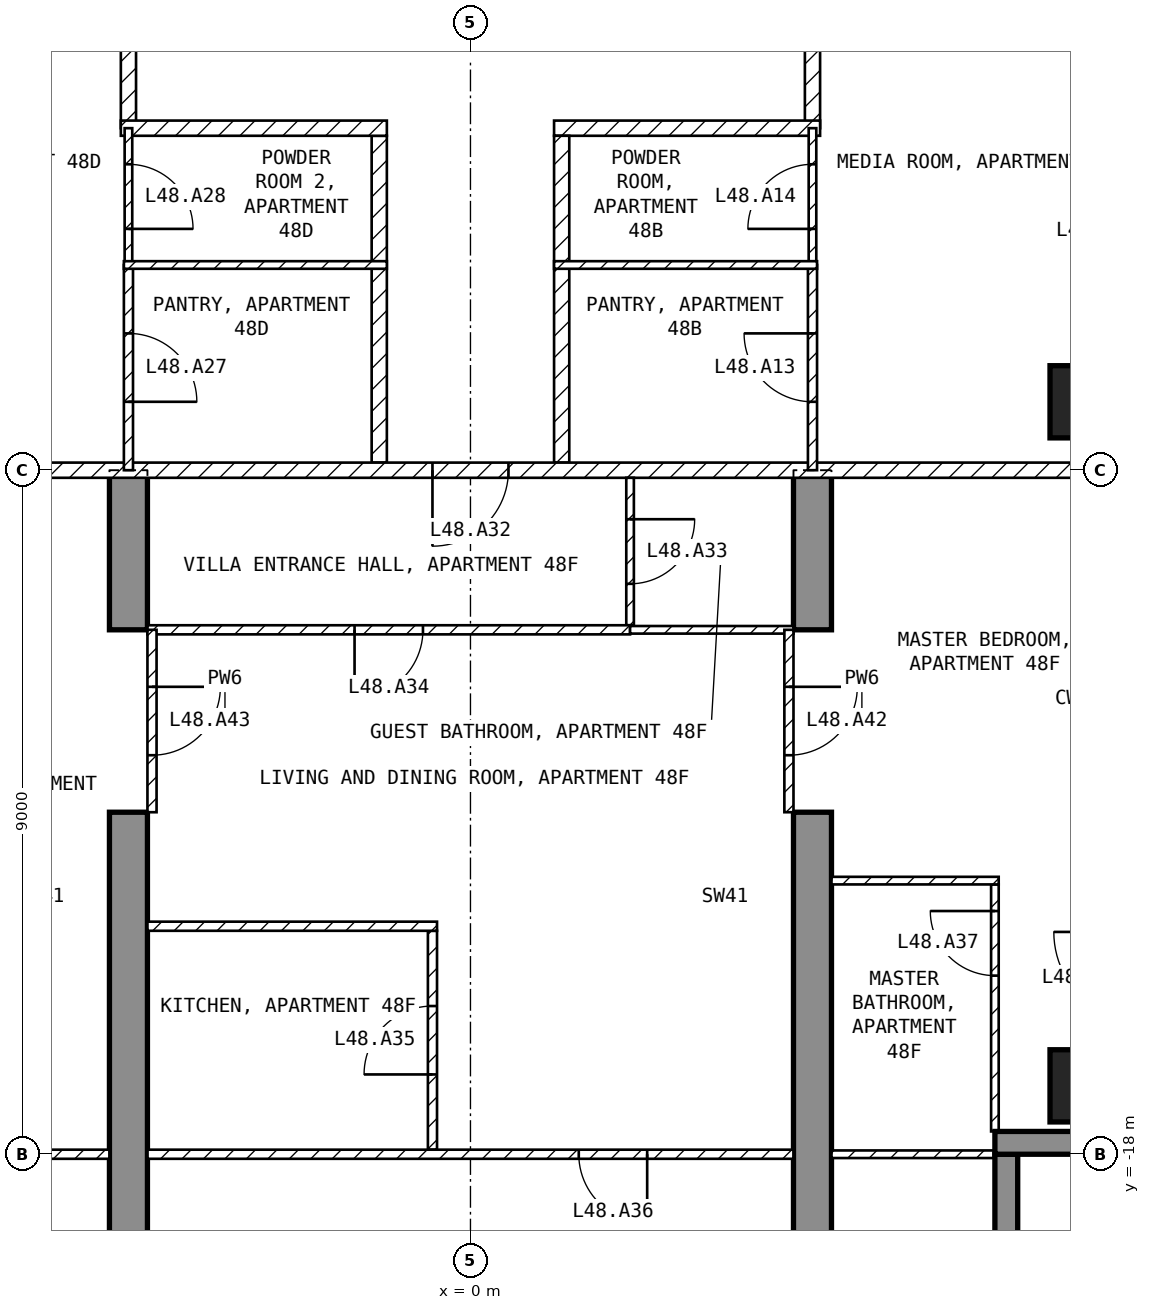
"""IFC4 building model, lengths in metres.
Left out: names, types, materials, properties, quantities, classifications, styles, units other than length and angle.
Written with IfcOpenShell. Run it as: python <this file> out.ifc"""

import sys

from ifc_helpers import new_model, si_unit, direction, frame, frame_2d, origin, origin_2d, place, context, subcontext, project, spatial, polyline, rectangle, outline, extrude, element, fill, save


model = new_model("IFC4")
c1 = context("Model", 3, precision=1e-05, world=origin(), true_north=direction((0.0, 1.0)))
c2 = subcontext(c1, "Body", "Model", "MODEL_VIEW")
j1 = project(units=[si_unit("LENGTHUNIT", "METRE"), si_unit("PLANEANGLEUNIT", "RADIAN")], contexts=[c1])
p1 = place(None, origin())
s1 = spatial("IfcSite", under=j1, at=p1, CompositionType="ELEMENT")
p2 = place(p1, origin())
s2 = spatial("IfcBuilding", under=s1, at=p2, CompositionType="ELEMENT")
p3 = place(p2, frame((0.0, 0.0, 194.6)))
s3 = spatial("IfcBuildingStorey", under=s2, at=p3, CompositionType="ELEMENT", Elevation=194.6)
for number, where, z_axis, x_axis in (
    (1, (8.1, -17.1, -0.25), (0.0, 0.0, 1.0), (1.0, 0.0, 0.0)),
    (2, (8.1, -8.1, -0.25), (0.0, 0.0, 1.0), (1.0, 0.0, 0.0)),
):
    element("IfcColumn", number, at=place(p3, frame(where, z_axis=z_axis, x_axis=x_axis)), inside=s3, PredefinedType="COLUMN", context=c2, shape_type="SweptSolid", body=[
        extrude(rectangle(XDim=0.95, YDim=0.95, at=origin_2d()), origin(), (0.0, 0.0, 1.0), 3.5),
    ])
for number, where, z_axis, x_axis in (
    (3, (-4.75, -20.225, -0.25), (1.0, 0.0, 0.0), (0.0, 1.0, 0.0)),
    (4, (4.25, -20.225, -0.25), (1.0, 0.0, 0.0), (0.0, 1.0, 0.0)),
):
    element("IfcWall", number, at=place(p3, frame(where, z_axis=z_axis, x_axis=x_axis)), inside=s3, PredefinedType="SHEAR", context=c2, shape_type="SweptSolid", body=[
        extrude(outline(polyline([(0.0, 0.0), (6.725, 0.0), (6.725, 2.65), (9.125, 2.65), (9.125, 0.0), (11.225, 0.0), (11.225, 3.5), (0.0, 3.5), (0.0, 0.0)])), origin(), (0.0, 0.0, 1.0), 0.5),
    ])
p4 = place(p3, frame((7.05, -19.8, 0.0), z_axis=(0.0, 0.0, 1.0), x_axis=(0.0, 1.0, 0.0)))
e5 = element("IfcWall", 5, at=p4, inside=s3, PredefinedType="SOLIDWALL", context=c2, shape_type="SweptSolid", body=[
    extrude(rectangle(XDim=1.8, YDim=0.3, at=frame_2d((0.9, 0.0))), origin(), (0.0, 0.0, 1.0), 3.25),
])
p5 = place(p3, frame((6.9, -17.85, 0.0), z_axis=(0.0, 0.0, 1.0), x_axis=(1.0, 0.0, 0.0)))
e6 = element("IfcWall", 6, at=p5, inside=s3, PredefinedType="SOLIDWALL", context=c2, shape_type="SweptSolid", body=[
    extrude(rectangle(XDim=1.85, YDim=0.3, at=frame_2d((0.925, 0.0))), origin(), (0.0, 0.0, 1.0), 3.25),
])
p6 = place(p3, frame((4.5, -1.3, 0.0), z_axis=(0.0, 0.0, 1.0), x_axis=(0.0, -1.0, 0.0)))
e7 = element("IfcWall", 7, at=p6, inside=s3, PredefinedType="PARTITIONING", context=c2, shape_type="SweptSolid", body=[
    extrude(rectangle(XDim=3.2, YDim=0.2, at=frame_2d((1.6, 0.0))), origin(), (0.0, 0.0, 1.0), 3.25),
])
p7 = place(p3, frame((4.6, -4.5, 0.0), z_axis=(0.0, 0.0, 1.0), x_axis=(-1.0, 0.0, 0.0)))
e8 = element("IfcWall", 8, at=p7, inside=s3, PredefinedType="PARTITIONING", context=c2, shape_type="SweptSolid", body=[
    extrude(rectangle(XDim=3.5, YDim=0.2, at=frame_2d((1.75, 0.0))), origin(), (0.0, 0.0, 1.0), 3.25),
])
p8 = place(p3, frame((1.2, -4.6, 0.0), z_axis=(0.0, 0.0, 1.0), x_axis=(0.0, -1.0, 0.0)))
e9 = element("IfcWall", 9, at=p8, inside=s3, PredefinedType="PARTITIONING", context=c2, shape_type="SweptSolid", body=[
    extrude(rectangle(XDim=4.3, YDim=0.2, at=frame_2d((2.15, 0.0))), origin(), (0.0, 0.0, 1.0), 3.25),
])
p9 = place(p3, frame((-4.5, -4.5, 0.0), z_axis=(0.0, 0.0, 1.0), x_axis=(0.0, 1.0, 0.0)))
e10 = element("IfcWall", 10, at=p9, inside=s3, PredefinedType="PARTITIONING", context=c2, shape_type="SweptSolid", body=[
    extrude(rectangle(XDim=3.2, YDim=0.2, at=frame_2d((1.6, 0.0))), origin(), (0.0, 0.0, 1.0), 3.25),
])
p10 = place(p3, frame((-1.2, -8.9, 0.0), z_axis=(0.0, 0.0, 1.0), x_axis=(0.0, 1.0, 0.0)))
e11 = element("IfcWall", 11, at=p10, inside=s3, PredefinedType="PARTITIONING", context=c2, shape_type="SweptSolid", body=[
    extrude(rectangle(XDim=4.3, YDim=0.2, at=frame_2d((2.15, 0.0))), origin(), (0.0, 0.0, 1.0), 3.25),
])
p11 = place(p3, frame((-1.1, -4.5, 0.0), z_axis=(0.0, 0.0, 1.0), x_axis=(-1.0, 0.0, 0.0)))
e12 = element("IfcWall", 12, at=p11, inside=s3, PredefinedType="PARTITIONING", context=c2, shape_type="SweptSolid", body=[
    extrude(rectangle(XDim=3.5, YDim=0.2, at=frame_2d((1.75, 0.0))), origin(), (0.0, 0.0, 1.0), 3.25),
])
p12 = place(p3, frame((8.92, -9.0, 0.0), z_axis=(0.0, 0.0, 1.0), x_axis=(-1.0, 0.0, 0.0)))
e13 = element("IfcWall", 13, at=p12, inside=s3, PredefinedType="PARTITIONING", context=c2, shape_type="SweptSolid", body=[
    extrude(rectangle(XDim=17.84, YDim=0.2, at=frame_2d((8.92, 0.0))), origin(), (0.0, 0.0, 1.0), 3.25),
])
p13 = place(p12, frame((8.42, 0.0, 0.0)))
e14 = element("IfcOpeningElement", 14, at=p13, cuts=e13, PredefinedType="OPENING", context=c2, shape_type="SweptSolid", body=[
    extrude(rectangle(XDim=1.0, YDim=2.1, at=frame_2d((0.5, 1.05))), frame((0.0, 0.11, 0.0), z_axis=(0.0, -1.0, 0.0), x_axis=(1.0, 0.0, 0.0)), (0.0, 0.0, 1.0), 0.22),
])
p14 = place(p3, frame((4.5, -6.3, 0.0), z_axis=(0.0, 0.0, 1.0), x_axis=(0.0, 1.0, 0.0)))
e15 = element("IfcWall", 15, at=p14, inside=s3, PredefinedType="PARTITIONING", context=c2, shape_type="SweptSolid", body=[
    extrude(rectangle(XDim=1.8, YDim=0.1, at=frame_2d((0.9, 0.0))), origin(), (0.0, 0.0, 1.0), 3.25),
])
p15 = place(p14, frame((0.475, 0.0, 0.0)))
e16 = element("IfcOpeningElement", 16, at=p15, cuts=e15, PredefinedType="OPENING", context=c2, shape_type="SweptSolid", body=[
    extrude(rectangle(XDim=0.85, YDim=2.1, at=frame_2d((0.425, 1.05))), frame((0.0, 0.06, 0.0), z_axis=(0.0, -1.0, 0.0), x_axis=(1.0, 0.0, 0.0)), (0.0, 0.0, 1.0), 0.12),
])
p16 = place(p3, frame((4.5, -9.0, 0.0), z_axis=(0.0, 0.0, 1.0), x_axis=(0.0, 1.0, 0.0)))
e17 = element("IfcWall", 17, at=p16, inside=s3, PredefinedType="PARTITIONING", context=c2, shape_type="SweptSolid", body=[
    extrude(rectangle(XDim=2.7, YDim=0.12, at=frame_2d((1.35, 0.0))), origin(), (0.0, 0.0, 1.0), 3.25),
])
p17 = place(p16, frame((0.9, 0.0, 0.0)))
e18 = element("IfcOpeningElement", 18, at=p17, cuts=e17, PredefinedType="OPENING", context=c2, shape_type="SweptSolid", body=[
    extrude(rectangle(XDim=0.9, YDim=2.1, at=frame_2d((0.45, 1.05))), frame((0.0, 0.07, 0.0), z_axis=(0.0, -1.0, 0.0), x_axis=(1.0, 0.0, 0.0)), (0.0, 0.0, 1.0), 0.14),
])
p18 = place(p3, frame((4.56, -6.3, 0.0), z_axis=(0.0, 0.0, 1.0), x_axis=(-1.0, 0.0, 0.0)))
e19 = element("IfcWall", 19, at=p18, inside=s3, PredefinedType="PARTITIONING", context=c2, shape_type="SweptSolid", body=[
    extrude(rectangle(XDim=3.46, YDim=0.1, at=frame_2d((1.73, 0.0))), origin(), (0.0, 0.0, 1.0), 3.25),
])
p19 = place(p3, frame((-4.5, -4.5, 0.0), z_axis=(0.0, 0.0, 1.0), x_axis=(0.0, -1.0, 0.0)))
e20 = element("IfcWall", 20, at=p19, inside=s3, PredefinedType="PARTITIONING", context=c2, shape_type="SweptSolid", body=[
    extrude(rectangle(XDim=1.8, YDim=0.1, at=frame_2d((0.9, 0.0))), origin(), (0.0, 0.0, 1.0), 3.25),
])
p20 = place(p19, frame((0.475, 0.0, 0.0)))
e21 = element("IfcOpeningElement", 21, at=p20, cuts=e20, PredefinedType="OPENING", context=c2, shape_type="SweptSolid", body=[
    extrude(rectangle(XDim=0.85, YDim=2.1, at=frame_2d((0.425, 1.05))), frame((0.0, 0.06, 0.0), z_axis=(0.0, -1.0, 0.0), x_axis=(1.0, 0.0, 0.0)), (0.0, 0.0, 1.0), 0.12),
])
p21 = place(p3, frame((-4.5, -6.3, 0.0), z_axis=(0.0, 0.0, 1.0), x_axis=(0.0, -1.0, 0.0)))
e22 = element("IfcWall", 22, at=p21, inside=s3, PredefinedType="PARTITIONING", context=c2, shape_type="SweptSolid", body=[
    extrude(rectangle(XDim=2.7, YDim=0.12, at=frame_2d((1.35, 0.0))), origin(), (0.0, 0.0, 1.0), 3.25),
])
p22 = place(p21, frame((0.9, 0.0, 0.0)))
e23 = element("IfcOpeningElement", 23, at=p22, cuts=e22, PredefinedType="OPENING", context=c2, shape_type="SweptSolid", body=[
    extrude(rectangle(XDim=0.9, YDim=2.1, at=frame_2d((0.45, 1.05))), frame((0.0, 0.07, 0.0), z_axis=(0.0, -1.0, 0.0), x_axis=(1.0, 0.0, 0.0)), (0.0, 0.0, 1.0), 0.14),
])
p23 = place(p3, frame((-1.1, -6.3, 0.0), z_axis=(0.0, 0.0, 1.0), x_axis=(-1.0, 0.0, 0.0)))
e24 = element("IfcWall", 24, at=p23, inside=s3, PredefinedType="PARTITIONING", context=c2, shape_type="SweptSolid", body=[
    extrude(rectangle(XDim=3.46, YDim=0.1, at=frame_2d((1.73, 0.0))), origin(), (0.0, 0.0, 1.0), 3.25),
])
p24 = place(p3, frame((2.1, -9.1, 0.0), z_axis=(0.0, 0.0, 1.0), x_axis=(0.0, -1.0, 0.0)))
e25 = element("IfcWall", 25, at=p24, inside=s3, PredefinedType="PARTITIONING", context=c2, shape_type="SweptSolid", body=[
    extrude(rectangle(XDim=1.94, YDim=0.1, at=frame_2d((0.97, 0.0))), origin(), (0.0, 0.0, 1.0), 3.25),
])
p25 = place(p24, frame((0.545, 0.0, 0.0)))
e26 = element("IfcOpeningElement", 26, at=p25, cuts=e25, PredefinedType="OPENING", context=c2, shape_type="SweptSolid", body=[
    extrude(rectangle(XDim=0.85, YDim=2.1, at=frame_2d((0.425, 1.05))), frame((0.0, 0.06, 0.0), z_axis=(0.0, -1.0, 0.0), x_axis=(1.0, 0.0, 0.0)), (0.0, 0.0, 1.0), 0.12),
])
p26 = place(p3, frame((2.1, -11.1, 0.0), z_axis=(0.0, 0.0, 1.0), x_axis=(-1.0, 0.0, 0.0)))
e27 = element("IfcWall", 27, at=p26, inside=s3, PredefinedType="PARTITIONING", context=c2, shape_type="SweptSolid", body=[
    extrude(rectangle(XDim=6.35, YDim=0.12, at=frame_2d((3.175, 0.0))), origin(), (0.0, 0.0, 1.0), 3.25),
])
p27 = place(p26, frame((2.725, 0.0, 0.0)))
e28 = element("IfcOpeningElement", 28, at=p27, cuts=e27, PredefinedType="OPENING", context=c2, shape_type="SweptSolid", body=[
    extrude(rectangle(XDim=0.9, YDim=2.1, at=frame_2d((0.45, 1.05))), frame((0.0, 0.07, 0.0), z_axis=(0.0, -1.0, 0.0), x_axis=(1.0, 0.0, 0.0)), (0.0, 0.0, 1.0), 0.14),
])
p28 = place(p3, frame((4.25, -11.1, 0.0), z_axis=(0.0, 0.0, 1.0), x_axis=(-1.0, 0.0, 0.0)))
e29 = element("IfcWall", 29, at=p28, inside=s3, PredefinedType="PARTITIONING", context=c2, shape_type="SweptSolid", body=[
    extrude(rectangle(XDim=2.15, YDim=0.1, at=frame_2d((1.075, 0.0))), origin(), (0.0, 0.0, 1.0), 3.25),
])
p29 = place(p3, frame((-0.5, -17.94, 0.0), z_axis=(0.0, 0.0, 1.0), x_axis=(0.0, 1.0, 0.0)))
e30 = element("IfcWall", 30, at=p29, inside=s3, PredefinedType="PARTITIONING", context=c2, shape_type="SweptSolid", body=[
    extrude(rectangle(XDim=2.88, YDim=0.12, at=frame_2d((1.44, 0.0))), origin(), (0.0, 0.0, 1.0), 3.25),
])
p30 = place(p29, frame((0.99, 0.0, 0.0)))
e31 = element("IfcOpeningElement", 31, at=p30, cuts=e30, PredefinedType="OPENING", context=c2, shape_type="SweptSolid", body=[
    extrude(rectangle(XDim=0.9, YDim=2.1, at=frame_2d((0.45, 1.05))), frame((0.0, 0.07, 0.0), z_axis=(0.0, -1.0, 0.0), x_axis=(1.0, 0.0, 0.0)), (0.0, 0.0, 1.0), 0.14),
])
p31 = place(p3, frame((-0.44, -15.0, 0.0), z_axis=(0.0, 0.0, 1.0), x_axis=(-1.0, 0.0, 0.0)))
e32 = element("IfcWall", 32, at=p31, inside=s3, PredefinedType="PARTITIONING", context=c2, shape_type="SweptSolid", body=[
    extrude(rectangle(XDim=3.81, YDim=0.12, at=frame_2d((1.905, 0.0))), origin(), (0.0, 0.0, 1.0), 3.25),
])
p32 = place(p3, frame((4.25, -18.0, 0.0), z_axis=(0.0, 0.0, 1.0), x_axis=(-1.0, 0.0, 0.0)))
e33 = element("IfcWall", 33, at=p32, inside=s3, PredefinedType="PARTITIONING", context=c2, shape_type="SweptSolid", body=[
    extrude(rectangle(XDim=8.5, YDim=0.12, at=frame_2d((4.25, 0.0))), origin(), (0.0, 0.0, 1.0), 3.25),
])
p33 = place(p32, frame((1.925, 0.0, 0.0)))
e34 = element("IfcOpeningElement", 34, at=p33, cuts=e33, PredefinedType="OPENING", context=c2, shape_type="SweptSolid", body=[
    extrude(rectangle(XDim=0.9, YDim=2.1, at=frame_2d((0.45, 1.05))), frame((0.0, 0.07, 0.0), z_axis=(0.0, -1.0, 0.0), x_axis=(1.0, 0.0, 0.0)), (0.0, 0.0, 1.0), 0.14),
])
p34 = place(p3, frame((6.9, -17.7, 0.0), z_axis=(0.0, 0.0, 1.0), x_axis=(0.0, 1.0, 0.0)))
e35 = element("IfcWall", 35, at=p34, inside=s3, PredefinedType="PARTITIONING", context=c2, shape_type="SweptSolid", body=[
    extrude(rectangle(XDim=3.25, YDim=0.1, at=frame_2d((1.625, 0.0))), origin(), (0.0, 0.0, 1.0), 3.25),
])
p35 = place(p34, frame((2.05, 0.0, 0.0)))
e36 = element("IfcOpeningElement", 36, at=p35, cuts=e35, PredefinedType="OPENING", context=c2, shape_type="SweptSolid", body=[
    extrude(rectangle(XDim=0.85, YDim=2.1, at=frame_2d((0.425, 1.05))), frame((0.0, 0.06, 0.0), z_axis=(0.0, -1.0, 0.0), x_axis=(1.0, 0.0, 0.0)), (0.0, 0.0, 1.0), 0.12),
])
p36 = place(p3, frame((6.95, -14.4, 0.0), z_axis=(0.0, 0.0, 1.0), x_axis=(-1.0, 0.0, 0.0)))
e37 = element("IfcWall", 37, at=p36, inside=s3, PredefinedType="PARTITIONING", context=c2, shape_type="SweptSolid", body=[
    extrude(rectangle(XDim=2.2, YDim=0.1, at=frame_2d((1.1, 0.0))), origin(), (0.0, 0.0, 1.0), 3.25),
])
p37 = place(p3, frame((7.12, -18.0, 0.0), z_axis=(0.0, 0.0, 1.0), x_axis=(-1.0, 0.0, 0.0)))
e38 = element("IfcWall", 38, at=p37, inside=s3, PredefinedType="PARTITIONING", context=c2, shape_type="SweptSolid", body=[
    extrude(rectangle(XDim=2.37, YDim=0.1, at=frame_2d((1.185, 0.0))), origin(), (0.0, 0.0, 1.0), 3.25),
])
p38 = place(p3, frame((-4.75, -18.0, 0.0), z_axis=(0.0, 0.0, 1.0), x_axis=(-1.0, 0.0, 0.0)))
e39 = element("IfcWall", 39, at=p38, inside=s3, PredefinedType="PARTITIONING", context=c2, shape_type="SweptSolid", body=[
    extrude(rectangle(XDim=2.37, YDim=0.12, at=frame_2d((1.185, 0.0))), origin(), (0.0, 0.0, 1.0), 3.25),
])
p39 = place(p3, frame((4.19, -11.1, 0.0), z_axis=(0.0, 0.0, 1.0), x_axis=(0.0, -1.0, 0.0)))
e40 = element("IfcWall", 40, at=p39, inside=s3, PredefinedType="PARTITIONING", context=c2, shape_type="SweptSolid", body=[
    extrude(rectangle(XDim=2.4, YDim=0.12, at=frame_2d((1.2, 0.0))), origin(), (0.0, 0.0, 1.0), 2.4),
])
p40 = place(p39, frame((0.75, 0.0, 0.0)))
e41 = element("IfcOpeningElement", 41, at=p40, cuts=e40, PredefinedType="OPENING", context=c2, shape_type="SweptSolid", body=[
    extrude(rectangle(XDim=0.9, YDim=2.1, at=frame_2d((0.45, 1.05))), frame((0.0, 0.07, 0.0), z_axis=(0.0, -1.0, 0.0), x_axis=(1.0, 0.0, 0.0)), (0.0, 0.0, 1.0), 0.14),
])
p41 = place(p3, frame((-4.19, -11.1, 0.0), z_axis=(0.0, 0.0, 1.0), x_axis=(0.0, -1.0, 0.0)))
e42 = element("IfcWall", 42, at=p41, inside=s3, PredefinedType="PARTITIONING", context=c2, shape_type="SweptSolid", body=[
    extrude(rectangle(XDim=2.4, YDim=0.12, at=frame_2d((1.2, 0.0))), origin(), (0.0, 0.0, 1.0), 2.4),
])
p42 = place(p41, frame((0.75, 0.0, 0.0)))
e43 = element("IfcOpeningElement", 43, at=p42, cuts=e42, PredefinedType="OPENING", context=c2, shape_type="SweptSolid", body=[
    extrude(rectangle(XDim=0.9, YDim=2.1, at=frame_2d((0.45, 1.05))), frame((0.0, 0.07, 0.0), z_axis=(0.0, -1.0, 0.0), x_axis=(1.0, 0.0, 0.0)), (0.0, 0.0, 1.0), 0.14),
])
p43 = place(p17, origin())
e44 = element("IfcDoor", 44, at=p43, inside=s3, OperationType="SINGLE_SWING_RIGHT", PredefinedType="DOOR", context=c2, shape_type="SweptSolid", body=[
    extrude(rectangle(XDim=0.9, YDim=2.1, at=frame_2d((0.45, 1.05))), frame((0.0, 0.025, 0.0), z_axis=(0.0, -1.0, 0.0), x_axis=(1.0, 0.0, 0.0)), (0.0, 0.0, 1.0), 0.05),
])
fill(e18, e44)
p44 = place(p15, origin())
e45 = element("IfcDoor", 45, at=p44, inside=s3, OperationType="SINGLE_SWING_LEFT", PredefinedType="DOOR", context=c2, shape_type="SweptSolid", body=[
    extrude(rectangle(XDim=0.85, YDim=2.1, at=frame_2d((0.425, 1.05))), frame((0.0, 0.025, 0.0), z_axis=(0.0, -1.0, 0.0), x_axis=(1.0, 0.0, 0.0)), (0.0, 0.0, 1.0), 0.05),
])
fill(e16, e45)
p45 = place(p22, origin())
e46 = element("IfcDoor", 46, at=p45, inside=s3, OperationType="SINGLE_SWING_RIGHT", PredefinedType="DOOR", context=c2, shape_type="SweptSolid", body=[
    extrude(rectangle(XDim=0.9, YDim=2.1, at=frame_2d((0.45, 1.05))), frame((0.0, 0.025, 0.0), z_axis=(0.0, -1.0, 0.0), x_axis=(1.0, 0.0, 0.0)), (0.0, 0.0, 1.0), 0.05),
])
fill(e23, e46)
p46 = place(p20, origin())
e47 = element("IfcDoor", 47, at=p46, inside=s3, OperationType="SINGLE_SWING_RIGHT", PredefinedType="DOOR", context=c2, shape_type="SweptSolid", body=[
    extrude(rectangle(XDim=0.85, YDim=2.1, at=frame_2d((0.425, 1.05))), frame((0.0, 0.025, 0.0), z_axis=(0.0, -1.0, 0.0), x_axis=(1.0, 0.0, 0.0)), (0.0, 0.0, 1.0), 0.05),
])
fill(e21, e47)
p47 = place(p13, origin())
e48 = element("IfcDoor", 48, at=p47, inside=s3, OperationType="SINGLE_SWING_RIGHT", PredefinedType="DOOR", context=c2, shape_type="SweptSolid", body=[
    extrude(rectangle(XDim=1.0, YDim=2.1, at=frame_2d((0.5, 1.05))), frame((0.0, 0.025, 0.0), z_axis=(0.0, -1.0, 0.0), x_axis=(1.0, 0.0, 0.0)), (0.0, 0.0, 1.0), 0.05),
])
fill(e14, e48)
p48 = place(p25, origin())
e49 = element("IfcDoor", 49, at=p48, inside=s3, OperationType="SINGLE_SWING_LEFT", PredefinedType="DOOR", context=c2, shape_type="SweptSolid", body=[
    extrude(rectangle(XDim=0.85, YDim=2.1, at=frame_2d((0.425, 1.05))), frame((0.0, 0.025, 0.0), z_axis=(0.0, -1.0, 0.0), x_axis=(1.0, 0.0, 0.0)), (0.0, 0.0, 1.0), 0.05),
])
fill(e26, e49)
p49 = place(p27, origin())
e50 = element("IfcDoor", 50, at=p49, inside=s3, OperationType="SINGLE_SWING_RIGHT", PredefinedType="DOOR", context=c2, shape_type="SweptSolid", body=[
    extrude(rectangle(XDim=0.9, YDim=2.1, at=frame_2d((0.45, 1.05))), frame((0.0, 0.025, 0.0), z_axis=(0.0, -1.0, 0.0), x_axis=(1.0, 0.0, 0.0)), (0.0, 0.0, 1.0), 0.05),
])
fill(e28, e50)
p50 = place(p30, origin())
e51 = element("IfcDoor", 51, at=p50, inside=s3, OperationType="SINGLE_SWING_LEFT", PredefinedType="DOOR", context=c2, shape_type="SweptSolid", body=[
    extrude(rectangle(XDim=0.9, YDim=2.1, at=frame_2d((0.45, 1.05))), frame((0.0, 0.025, 0.0), z_axis=(0.0, -1.0, 0.0), x_axis=(1.0, 0.0, 0.0)), (0.0, 0.0, 1.0), 0.05),
])
fill(e31, e51)
p51 = place(p33, origin())
e52 = element("IfcDoor", 52, at=p51, inside=s3, OperationType="SINGLE_SWING_LEFT", PredefinedType="DOOR", context=c2, shape_type="SweptSolid", body=[
    extrude(rectangle(XDim=0.9, YDim=2.1, at=frame_2d((0.45, 1.05))), frame((0.0, 0.025, 0.0), z_axis=(0.0, -1.0, 0.0), x_axis=(1.0, 0.0, 0.0)), (0.0, 0.0, 1.0), 0.05),
])
fill(e34, e52)
p52 = place(p35, origin())
e53 = element("IfcDoor", 53, at=p52, inside=s3, OperationType="SINGLE_SWING_RIGHT", PredefinedType="DOOR", context=c2, shape_type="SweptSolid", body=[
    extrude(rectangle(XDim=0.85, YDim=2.1, at=frame_2d((0.425, 1.05))), frame((0.0, 0.025, 0.0), z_axis=(0.0, -1.0, 0.0), x_axis=(1.0, 0.0, 0.0)), (0.0, 0.0, 1.0), 0.05),
])
fill(e36, e53)
p53 = place(p40, origin())
e54 = element("IfcDoor", 54, at=p53, inside=s3, OperationType="SINGLE_SWING_LEFT", PredefinedType="DOOR", context=c2, shape_type="SweptSolid", body=[
    extrude(rectangle(XDim=0.9, YDim=2.1, at=frame_2d((0.45, 1.05))), frame((0.0, 0.025, 0.0), z_axis=(0.0, -1.0, 0.0), x_axis=(1.0, 0.0, 0.0)), (0.0, 0.0, 1.0), 0.05),
])
fill(e41, e54)
p54 = place(p42, origin())
e55 = element("IfcDoor", 55, at=p54, inside=s3, OperationType="SINGLE_SWING_LEFT", PredefinedType="DOOR", context=c2, shape_type="SweptSolid", body=[
    extrude(rectangle(XDim=0.9, YDim=2.1, at=frame_2d((0.45, 1.05))), frame((0.0, 0.025, 0.0), z_axis=(0.0, -1.0, 0.0), x_axis=(1.0, 0.0, 0.0)), (0.0, 0.0, 1.0), 0.05),
])
fill(e43, e55)
save(model, sys.argv[1])
